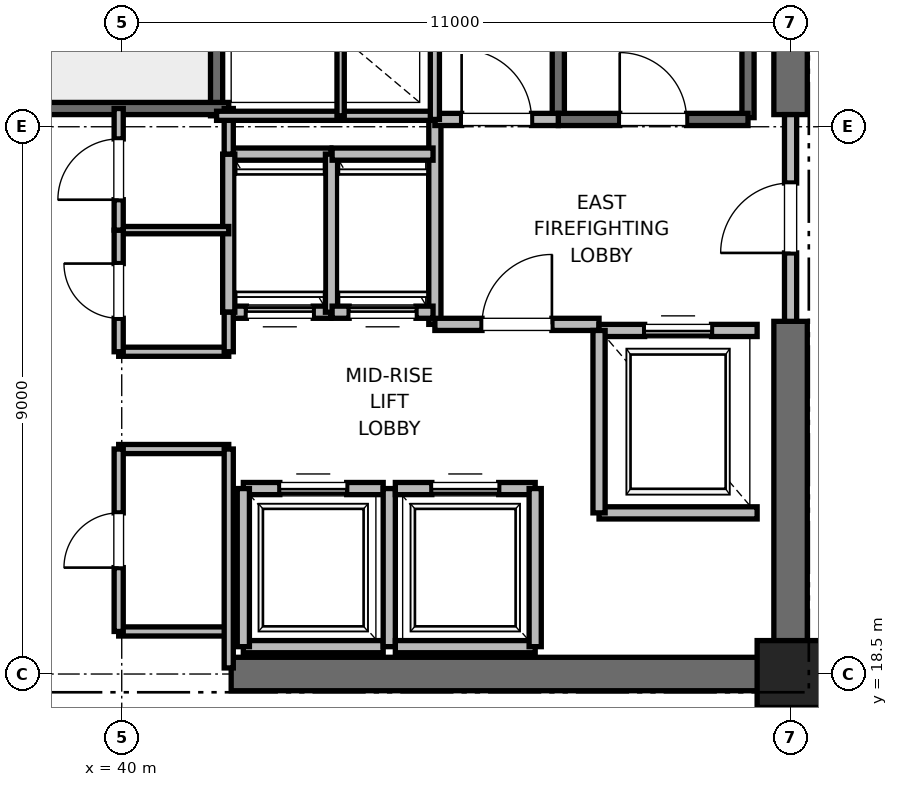
"""IFC4 building model, lengths in metres.
Left out: names, types, materials, properties, quantities, classifications, styles, units other than length and angle.
Written with IfcOpenShell. Run it as: python <this file> out.ifc"""

import sys

from ifc_helpers import new_model, si_unit, direction, frame, frame_2d, origin, origin_2d, place, context, subcontext, project, spatial, rectangle, extrude, element, fill, save


model = new_model("IFC4")
c1 = context("Model", 3, precision=1e-05, world=origin(), true_north=direction((0.0, 1.0)))
c2 = subcontext(c1, "Body", "Model", "MODEL_VIEW")
j1 = project(units=[si_unit("LENGTHUNIT", "METRE"), si_unit("PLANEANGLEUNIT", "RADIAN")], contexts=[c1])
p1 = place(None, origin())
s1 = spatial("IfcSite", under=j1, at=p1, CompositionType="ELEMENT")
p2 = place(p1, origin())
s2 = spatial("IfcBuilding", under=s1, at=p2, CompositionType="ELEMENT")
p3 = place(p2, frame((0.0, 0.0, 123.4)))
s3 = spatial("IfcBuildingStorey", under=s2, at=p3, CompositionType="ELEMENT", Elevation=123.4)
p4 = place(p3, frame((51.0, 18.5, 0.0), z_axis=(0.0, 0.0, 1.0), x_axis=(1.0, 0.0, 0.0)))
e1 = element("IfcColumn", 1, at=p4, inside=s3, PredefinedType="PILASTER", context=c2, shape_type="SweptSolid", body=[
    extrude(rectangle(XDim=1.1, YDim=1.1, at=origin_2d()), origin(), (0.0, 0.0, 1.0), 5.0),
])
p5 = place(p3, frame((41.8, 18.5, 0.0), z_axis=(0.0, 0.0, 1.0), x_axis=(1.0, 0.0, 0.0)))
e2 = element("IfcWall", 2, at=p5, inside=s3, PredefinedType="SHEAR", context=c2, shape_type="SweptSolid", body=[
    extrude(rectangle(XDim=9.2, YDim=0.55, at=frame_2d((4.6, 0.0))), origin(), (0.0, 0.0, 1.0), 4.775),
])
p6 = place(p3, frame((51.0, 18.5, 0.0), z_axis=(0.0, 0.0, 1.0), x_axis=(0.0, 1.0, 0.0)))
e3 = element("IfcWall", 3, at=p6, inside=s3, PredefinedType="SHEAR", context=c2, shape_type="SweptSolid", body=[
    extrude(rectangle(XDim=5.8, YDim=0.55, at=frame_2d((2.9, 0.0))), origin(), (0.0, 0.0, 1.0), 4.775),
])
p7 = place(p3, frame((51.0, 27.7, 0.0), z_axis=(0.0, 0.0, 1.0), x_axis=(0.0, 1.0, 0.0)))
e4 = element("IfcWall", 4, at=p7, inside=s3, PredefinedType="SHEAR", context=c2, shape_type="SweptSolid", body=[
    extrude(rectangle(XDim=8.8, YDim=0.55, at=frame_2d((4.4, 0.0))), origin(), (0.0, 0.0, 1.0), 4.775),
])
p8 = place(p3, frame((50.3, 27.65, 0.0), z_axis=(0.0, 0.0, 1.0), x_axis=(0.0, 1.0, 0.0)))
e5 = element("IfcWall", 5, at=p8, inside=s3, PredefinedType="SOLIDWALL", context=c2, shape_type="SweptSolid", body=[
    extrude(rectangle(XDim=8.15, YDim=0.2, at=frame_2d((4.075, 0.0))), origin(), (0.0, 0.0, 1.0), 4.775),
])
p9 = place(p3, frame((47.18, 27.62, 0.0), z_axis=(0.0, 0.0, 1.0), x_axis=(0.0, 1.0, 0.0)))
e6 = element("IfcWall", 6, at=p9, inside=s3, PredefinedType="SOLIDWALL", context=c2, shape_type="SweptSolid", body=[
    extrude(rectangle(XDim=8.18, YDim=0.2, at=frame_2d((4.09, 0.0))), origin(), (0.0, 0.0, 1.0), 4.775),
])
p10 = place(p3, frame((47.18, 27.62, 0.0), z_axis=(0.0, 0.0, 1.0), x_axis=(1.0, 0.0, 0.0)))
e7 = element("IfcWall", 7, at=p10, inside=s3, PredefinedType="SOLIDWALL", context=c2, shape_type="SweptSolid", body=[
    extrude(rectangle(XDim=3.12, YDim=0.2, at=frame_2d((1.56, 0.0))), origin(), (0.0, 0.0, 1.0), 4.775),
])
p11 = place(p10, frame((1.01, 0.0, 0.0)))
e8 = element("IfcOpeningElement", 8, at=p11, cuts=e7, PredefinedType="OPENING", context=c2, shape_type="SweptSolid", body=[
    extrude(rectangle(XDim=1.1, YDim=2.15, at=frame_2d((0.55, 1.075))), frame((0.0, 0.1, 0.0), z_axis=(0.0, -1.0, 0.0), x_axis=(1.0, 0.0, 0.0)), (0.0, 0.0, 1.0), 0.2),
])
p12 = place(p3, frame((41.56, 27.68, 0.0), z_axis=(0.0, 0.0, 1.0), x_axis=(0.0, 1.0, 0.0)))
e9 = element("IfcWall", 9, at=p12, inside=s3, PredefinedType="SOLIDWALL", context=c2, shape_type="SweptSolid", body=[
    extrude(rectangle(XDim=8.57, YDim=0.2, at=frame_2d((4.285, 0.0))), origin(), (0.0, 0.0, 1.0), 4.775),
])
p13 = place(p3, frame((38.44, 27.8, 0.0), z_axis=(0.0, 0.0, 1.0), x_axis=(1.0, 0.0, 0.0)))
e10 = element("IfcWall", 10, at=p13, inside=s3, PredefinedType="SOLIDWALL", context=c2, shape_type="SweptSolid", body=[
    extrude(rectangle(XDim=3.32, YDim=0.2, at=frame_2d((1.66, 0.0))), origin(), (0.0, 0.0, 1.0), 4.775),
])
p14 = place(p3, frame((45.15, 24.25, 0.0), z_axis=(0.0, 0.0, 1.0), x_axis=(0.0, 1.0, 0.0)))
e11 = element("IfcWall", 11, at=p14, inside=s3, PredefinedType="PARTITIONING", context=c2, shape_type="SweptSolid", body=[
    extrude(rectangle(XDim=3.37, YDim=0.2, at=frame_2d((1.685, 0.0))), origin(), (0.0, 0.0, 1.0), 4.775),
])
p15 = place(p3, frame((45.15, 24.25, 0.0), z_axis=(0.0, 0.0, 1.0), x_axis=(1.0, 0.0, 0.0)))
e12 = element("IfcWall", 12, at=p15, inside=s3, PredefinedType="PARTITIONING", context=c2, shape_type="SweptSolid", body=[
    extrude(rectangle(XDim=2.7, YDim=0.2, at=frame_2d((1.35, 0.0))), origin(), (0.0, 0.0, 1.0), 4.775),
])
p16 = place(p15, frame((0.775, 0.0, 0.0)))
e13 = element("IfcOpeningElement", 13, at=p16, cuts=e12, PredefinedType="OPENING", context=c2, shape_type="SweptSolid", body=[
    extrude(rectangle(XDim=1.15, YDim=2.2, at=frame_2d((0.575, 1.1))), frame((0.0, 0.1, 0.0), z_axis=(0.0, -1.0, 0.0), x_axis=(1.0, 0.0, 0.0)), (0.0, 0.0, 1.0), 0.2),
])
p17 = place(p3, frame((45.15, 27.62, 0.0), z_axis=(0.0, 0.0, 1.0), x_axis=(1.0, 0.0, 0.0)))
e14 = element("IfcWall", 14, at=p17, inside=s3, PredefinedType="PARTITIONING", context=c2, shape_type="SweptSolid", body=[
    extrude(rectangle(XDim=2.03, YDim=0.2, at=frame_2d((1.015, 0.0))), origin(), (0.0, 0.0, 1.0), 4.775),
])
p18 = place(p17, frame((0.44, 0.0, 0.0)))
e15 = element("IfcOpeningElement", 15, at=p18, cuts=e14, PredefinedType="OPENING", context=c2, shape_type="SweptSolid", body=[
    extrude(rectangle(XDim=1.15, YDim=2.2, at=frame_2d((0.575, 1.1))), frame((0.0, 0.1, 0.0), z_axis=(0.0, -1.0, 0.0), x_axis=(1.0, 0.0, 0.0)), (0.0, 0.0, 1.0), 0.2),
])
p19 = place(p3, frame((51.0, 24.3, 0.0), z_axis=(0.0, 0.0, 1.0), x_axis=(0.0, 1.0, 0.0)))
e16 = element("IfcWall", 16, at=p19, inside=s3, PredefinedType="PARTITIONING", context=c2, shape_type="SweptSolid", body=[
    extrude(rectangle(XDim=3.4, YDim=0.2, at=frame_2d((1.7, 0.0))), origin(), (0.0, 0.0, 1.0), 3.755),
])
p20 = place(p19, frame((1.125, 0.0, 0.0)))
e17 = element("IfcOpeningElement", 17, at=p20, cuts=e16, PredefinedType="OPENING", context=c2, shape_type="SweptSolid", body=[
    extrude(rectangle(XDim=1.15, YDim=2.2, at=frame_2d((0.575, 1.1))), frame((0.0, 0.1, 0.0), z_axis=(0.0, -1.0, 0.0), x_axis=(1.0, 0.0, 0.0)), (0.0, 0.0, 1.0), 0.2),
])
p21 = place(p3, frame((47.85, 21.15, 0.0), z_axis=(0.0, 0.0, 1.0), x_axis=(1.0, 0.0, 0.0)))
e18 = element("IfcWall", 18, at=p21, inside=s3, PredefinedType="SOLIDWALL", context=c2, shape_type="SweptSolid", body=[
    extrude(rectangle(XDim=2.6, YDim=0.2, at=frame_2d((1.3, 0.0))), origin(), (0.0, 0.0, 1.0), 4.775),
])
p22 = place(p3, frame((50.45, 24.15, 0.0), z_axis=(0.0, 0.0, 1.0), x_axis=(-1.0, 0.0, 0.0)))
e19 = element("IfcWall", 19, at=p22, inside=s3, PredefinedType="SOLIDWALL", context=c2, shape_type="SweptSolid", body=[
    extrude(rectangle(XDim=2.6, YDim=0.2, at=frame_2d((1.3, 0.0))), origin(), (0.0, 0.0, 1.0), 3.755),
])
p23 = place(p22, frame((0.75, 0.0, 0.0)))
e20 = element("IfcOpeningElement", 20, at=p23, cuts=e19, PredefinedType="OPENING", context=c2, shape_type="SweptSolid", body=[
    extrude(rectangle(XDim=1.1, YDim=2.2, at=frame_2d((0.55, 1.1))), frame((0.0, 0.1, 0.0), z_axis=(0.0, -1.0, 0.0), x_axis=(1.0, 0.0, 0.0)), (0.0, 0.0, 1.0), 0.2),
])
p24 = place(p3, frame((47.85, 24.15, 0.0), z_axis=(0.0, 0.0, 1.0), x_axis=(0.0, -1.0, 0.0)))
e21 = element("IfcWall", 21, at=p24, inside=s3, PredefinedType="SOLIDWALL", context=c2, shape_type="SweptSolid", body=[
    extrude(rectangle(XDim=3.0, YDim=0.2, at=frame_2d((1.5, 0.0))), origin(), (0.0, 0.0, 1.0), 4.775),
])
p25 = place(p3, frame((42.0, 18.95, 0.0), z_axis=(0.0, 0.0, 1.0), x_axis=(1.0, 0.0, 0.0)))
e22 = element("IfcWall", 22, at=p25, inside=s3, PredefinedType="SOLIDWALL", context=c2, shape_type="SweptSolid", body=[
    extrude(rectangle(XDim=2.3, YDim=0.2, at=frame_2d((1.15, 0.0))), origin(), (0.0, 0.0, 1.0), 3.755),
])
p26 = place(p3, frame((44.3, 21.55, 0.0), z_axis=(0.0, 0.0, 1.0), x_axis=(-1.0, 0.0, 0.0)))
e23 = element("IfcWall", 23, at=p26, inside=s3, PredefinedType="SOLIDWALL", context=c2, shape_type="SweptSolid", body=[
    extrude(rectangle(XDim=2.3, YDim=0.2, at=frame_2d((1.15, 0.0))), origin(), (0.0, 0.0, 1.0), 4.775),
])
p27 = place(p26, frame((0.6, 0.0, 0.0)))
e24 = element("IfcOpeningElement", 24, at=p27, cuts=e23, PredefinedType="OPENING", context=c2, shape_type="SweptSolid", body=[
    extrude(rectangle(XDim=1.1, YDim=2.2, at=frame_2d((0.55, 1.1))), frame((0.0, 0.1, 0.0), z_axis=(0.0, -1.0, 0.0), x_axis=(1.0, 0.0, 0.0)), (0.0, 0.0, 1.0), 0.2),
])
p28 = place(p3, frame((42.0, 21.55, 0.0), z_axis=(0.0, 0.0, 1.0), x_axis=(0.0, -1.0, 0.0)))
e25 = element("IfcWall", 25, at=p28, inside=s3, PredefinedType="SOLIDWALL", context=c2, shape_type="SweptSolid", body=[
    extrude(rectangle(XDim=2.6, YDim=0.2, at=frame_2d((1.3, 0.0))), origin(), (0.0, 0.0, 1.0), 3.755),
])
p29 = place(p3, frame((44.4, 18.95, 0.0), z_axis=(0.0, 0.0, 1.0), x_axis=(0.0, 1.0, 0.0)))
e26 = element("IfcWall", 26, at=p29, inside=s3, PredefinedType="SOLIDWALL", context=c2, shape_type="SweptSolid", body=[
    extrude(rectangle(XDim=2.6, YDim=0.2, at=frame_2d((1.3, 0.0))), origin(), (0.0, 0.0, 1.0), 4.775),
])
p30 = place(p3, frame((44.5, 18.95, 0.0), z_axis=(0.0, 0.0, 1.0), x_axis=(1.0, 0.0, 0.0)))
e27 = element("IfcWall", 27, at=p30, inside=s3, PredefinedType="SOLIDWALL", context=c2, shape_type="SweptSolid", body=[
    extrude(rectangle(XDim=2.3, YDim=0.2, at=frame_2d((1.15, 0.0))), origin(), (0.0, 0.0, 1.0), 4.775),
])
p31 = place(p3, frame((46.8, 21.55, 0.0), z_axis=(0.0, 0.0, 1.0), x_axis=(-1.0, 0.0, 0.0)))
e28 = element("IfcWall", 28, at=p31, inside=s3, PredefinedType="SOLIDWALL", context=c2, shape_type="SweptSolid", body=[
    extrude(rectangle(XDim=2.3, YDim=0.2, at=frame_2d((1.15, 0.0))), origin(), (0.0, 0.0, 1.0), 4.775),
])
p32 = place(p31, frame((0.6, 0.0, 0.0)))
e29 = element("IfcOpeningElement", 29, at=p32, cuts=e28, PredefinedType="OPENING", context=c2, shape_type="SweptSolid", body=[
    extrude(rectangle(XDim=1.1, YDim=2.2, at=frame_2d((0.55, 1.1))), frame((0.0, 0.1, 0.0), z_axis=(0.0, -1.0, 0.0), x_axis=(1.0, 0.0, 0.0)), (0.0, 0.0, 1.0), 0.2),
])
p33 = place(p3, frame((46.8, 18.95, 0.0), z_axis=(0.0, 0.0, 1.0), x_axis=(0.0, 1.0, 0.0)))
e30 = element("IfcWall", 30, at=p33, inside=s3, PredefinedType="SOLIDWALL", context=c2, shape_type="SweptSolid", body=[
    extrude(rectangle(XDim=2.6, YDim=0.2, at=frame_2d((1.3, 0.0))), origin(), (0.0, 0.0, 1.0), 4.775),
])
p34 = place(p3, frame((41.76, 24.45, 0.0), z_axis=(0.0, 0.0, 1.0), x_axis=(1.0, 0.0, 0.0)))
e31 = element("IfcWall", 31, at=p34, inside=s3, PredefinedType="SOLIDWALL", context=c2, shape_type="SweptSolid", body=[
    extrude(rectangle(XDim=1.68, YDim=0.2, at=frame_2d((0.84, 0.0))), origin(), (0.0, 0.0, 1.0), 4.775),
])
p35 = place(p34, frame((0.29, 0.0, 0.0)))
e32 = element("IfcOpeningElement", 32, at=p35, cuts=e31, PredefinedType="OPENING", context=c2, shape_type="SweptSolid", body=[
    extrude(rectangle(XDim=1.1, YDim=2.2, at=frame_2d((0.55, 1.1))), frame((0.0, 0.1, 0.0), z_axis=(0.0, -1.0, 0.0), x_axis=(1.0, 0.0, 0.0)), (0.0, 0.0, 1.0), 0.2),
])
p36 = place(p3, frame((43.44, 27.05, 0.0), z_axis=(0.0, 0.0, 1.0), x_axis=(-1.0, 0.0, 0.0)))
e33 = element("IfcWall", 33, at=p36, inside=s3, PredefinedType="SOLIDWALL", context=c2, shape_type="SweptSolid", body=[
    extrude(rectangle(XDim=1.68, YDim=0.2, at=frame_2d((0.84, 0.0))), origin(), (0.0, 0.0, 1.0), 4.775),
])
for number, where, z_axis, x_axis in (
    (34, (41.76, 27.05, 0.0), (0.0, 0.0, 1.0), (0.0, -1.0, 0.0)),
    (35, (43.45, 24.45, 0.0), (0.0, 0.0, 1.0), (0.0, 1.0, 0.0)),
):
    element("IfcWall", number, at=place(p3, frame(where, z_axis=z_axis, x_axis=x_axis)), inside=s3, PredefinedType="SOLIDWALL", context=c2, shape_type="SweptSolid", body=[
        extrude(rectangle(XDim=2.6, YDim=0.2, at=frame_2d((1.3, 0.0))), origin(), (0.0, 0.0, 1.0), 4.775),
    ])
p37 = place(p3, frame((43.46, 24.45, 0.0), z_axis=(0.0, 0.0, 1.0), x_axis=(1.0, 0.0, 0.0)))
e36 = element("IfcWall", 36, at=p37, inside=s3, PredefinedType="SOLIDWALL", context=c2, shape_type="SweptSolid", body=[
    extrude(rectangle(XDim=1.66, YDim=0.2, at=frame_2d((0.83, 0.0))), origin(), (0.0, 0.0, 1.0), 4.775),
])
p38 = place(p37, frame((0.28, 0.0, 0.0)))
e37 = element("IfcOpeningElement", 37, at=p38, cuts=e36, PredefinedType="OPENING", context=c2, shape_type="SweptSolid", body=[
    extrude(rectangle(XDim=1.1, YDim=2.2, at=frame_2d((0.55, 1.1))), frame((0.0, 0.1, 0.0), z_axis=(0.0, -1.0, 0.0), x_axis=(1.0, 0.0, 0.0)), (0.0, 0.0, 1.0), 0.2),
])
p39 = place(p3, frame((45.12, 27.05, 0.0), z_axis=(0.0, 0.0, 1.0), x_axis=(-1.0, 0.0, 0.0)))
e38 = element("IfcWall", 38, at=p39, inside=s3, PredefinedType="SOLIDWALL", context=c2, shape_type="SweptSolid", body=[
    extrude(rectangle(XDim=1.66, YDim=0.2, at=frame_2d((0.83, 0.0))), origin(), (0.0, 0.0, 1.0), 4.775),
])
for number, where, z_axis, x_axis in (
    (39, (39.95, 19.2, 0.0), (0.0, 0.0, 1.0), (1.0, 0.0, 0.0)),
    (40, (39.95, 22.2, 0.0), (0.0, 0.0, 1.0), (1.0, 0.0, 0.0)),
    (41, (39.95, 23.8, 0.0), (0.0, 0.0, 1.0), (1.0, 0.0, 0.0)),
):
    element("IfcWall", number, at=place(p3, frame(where, z_axis=z_axis, x_axis=x_axis)), inside=s3, PredefinedType="PARTITIONING", context=c2, shape_type="SweptSolid", body=[
        extrude(rectangle(XDim=1.81, YDim=0.15, at=frame_2d((0.905, 0.0))), origin(), (0.0, 0.0, 1.0), 2.85),
    ])
p40 = place(p3, frame((39.95, 25.8, 0.0), z_axis=(0.0, 0.0, 1.0), x_axis=(1.0, 0.0, 0.0)))
e42 = element("IfcWall", 42, at=p40, inside=s3, PredefinedType="PARTITIONING", context=c2, shape_type="SweptSolid", body=[
    extrude(rectangle(XDim=1.81, YDim=0.12, at=frame_2d((0.905, 0.0))), origin(), (0.0, 0.0, 1.0), 2.85),
])
p41 = place(p3, frame((41.76, 18.6, 0.0), z_axis=(0.0, 0.0, 1.0), x_axis=(0.0, 1.0, 0.0)))
e43 = element("IfcWall", 43, at=p41, inside=s3, PredefinedType="PARTITIONING", context=c2, shape_type="SweptSolid", body=[
    extrude(rectangle(XDim=3.6, YDim=0.15, at=frame_2d((1.8, 0.0))), origin(), (0.0, 0.0, 1.0), 2.85),
])
p42 = place(p3, frame((41.76, 23.8, 0.0), z_axis=(0.0, 0.0, 1.0), x_axis=(0.0, 1.0, 0.0)))
e44 = element("IfcWall", 44, at=p42, inside=s3, PredefinedType="PARTITIONING", context=c2, shape_type="SweptSolid", body=[
    extrude(rectangle(XDim=0.65, YDim=0.15, at=frame_2d((0.325, 0.0))), origin(), (0.0, 0.0, 1.0), 2.85),
])
p43 = place(p3, frame((41.76, 27.05, 0.0), z_axis=(0.0, 0.0, 1.0), x_axis=(0.0, 1.0, 0.0)))
e45 = element("IfcWall", 45, at=p43, inside=s3, PredefinedType="PARTITIONING", context=c2, shape_type="SweptSolid", body=[
    extrude(rectangle(XDim=0.75, YDim=0.15, at=frame_2d((0.375, 0.0))), origin(), (0.0, 0.0, 1.0), 2.85),
])
p44 = place(p3, frame((39.95, 19.2, 0.0), z_axis=(0.0, 0.0, 1.0), x_axis=(0.0, 1.0, 0.0)))
e46 = element("IfcWall", 46, at=p44, inside=s3, PredefinedType="PARTITIONING", context=c2, shape_type="SweptSolid", body=[
    extrude(rectangle(XDim=3.0, YDim=0.15, at=frame_2d((1.5, 0.0))), origin(), (0.0, 0.0, 1.0), 2.85),
])
p45 = place(p44, frame((1.05, 0.0, 0.0)))
e47 = element("IfcOpeningElement", 47, at=p45, cuts=e46, PredefinedType="OPENING", context=c2, shape_type="SweptSolid", body=[
    extrude(rectangle(XDim=0.9, YDim=2.1, at=frame_2d((0.45, 1.05))), frame((0.0, 0.075, 0.0), z_axis=(0.0, -1.0, 0.0), x_axis=(1.0, 0.0, 0.0)), (0.0, 0.0, 1.0), 0.15),
])
p46 = place(p3, frame((39.95, 23.8, 0.0), z_axis=(0.0, 0.0, 1.0), x_axis=(0.0, 1.0, 0.0)))
e48 = element("IfcWall", 48, at=p46, inside=s3, PredefinedType="PARTITIONING", context=c2, shape_type="SweptSolid", body=[
    extrude(rectangle(XDim=2.0, YDim=0.15, at=frame_2d((1.0, 0.0))), origin(), (0.0, 0.0, 1.0), 2.85),
])
p47 = place(p46, frame((0.55, 0.0, 0.0)))
e49 = element("IfcOpeningElement", 49, at=p47, cuts=e48, PredefinedType="OPENING", context=c2, shape_type="SweptSolid", body=[
    extrude(rectangle(XDim=0.9, YDim=2.1, at=frame_2d((0.45, 1.05))), frame((0.0, 0.075, 0.0), z_axis=(0.0, -1.0, 0.0), x_axis=(1.0, 0.0, 0.0)), (0.0, 0.0, 1.0), 0.15),
])
p48 = place(p3, frame((39.95, 25.8, 0.0), z_axis=(0.0, 0.0, 1.0), x_axis=(0.0, 1.0, 0.0)))
e50 = element("IfcWall", 50, at=p48, inside=s3, PredefinedType="PARTITIONING", context=c2, shape_type="SweptSolid", body=[
    extrude(rectangle(XDim=2.0, YDim=0.15, at=frame_2d((1.0, 0.0))), origin(), (0.0, 0.0, 1.0), 2.85),
])
p49 = place(p48, frame((0.5, 0.0, 0.0)))
e51 = element("IfcOpeningElement", 51, at=p49, cuts=e50, PredefinedType="OPENING", context=c2, shape_type="SweptSolid", body=[
    extrude(rectangle(XDim=1.0, YDim=2.15, at=frame_2d((0.5, 1.075))), frame((0.0, 0.075, 0.0), z_axis=(0.0, -1.0, 0.0), x_axis=(1.0, 0.0, 0.0)), (0.0, 0.0, 1.0), 0.15),
])
p50 = place(p3, frame((41.56, 27.68, 0.0), z_axis=(0.0, 0.0, 1.0), x_axis=(1.0, 0.0, 0.0)))
e52 = element("IfcWall", 52, at=p50, inside=s3, PredefinedType="PARTITIONING", context=c2, shape_type="SweptSolid", body=[
    extrude(rectangle(XDim=3.59, YDim=0.15, at=frame_2d((1.795, 0.0))), origin(), (0.0, 0.0, 1.0), 2.85),
])
p51 = place(p3, frame((45.15, 27.62, 0.0), z_axis=(0.0, 0.0, 1.0), x_axis=(0.0, 1.0, 0.0)))
e53 = element("IfcWall", 53, at=p51, inside=s3, PredefinedType="PARTITIONING", context=c2, shape_type="SweptSolid", body=[
    extrude(rectangle(XDim=3.1, YDim=0.15, at=frame_2d((1.55, 0.0))), origin(), (0.0, 0.0, 1.0), 2.85),
])
p52 = place(p3, frame((43.6, 27.68, 0.0), z_axis=(0.0, 0.0, 1.0), x_axis=(0.0, 1.0, 0.0)))
e54 = element("IfcWall", 54, at=p52, inside=s3, PredefinedType="PARTITIONING", context=c2, shape_type="SweptSolid", body=[
    extrude(rectangle(XDim=3.04, YDim=0.12, at=frame_2d((1.52, 0.0))), origin(), (0.0, 0.0, 1.0), 2.85),
])
p53 = place(p11, origin())
e55 = element("IfcDoor", 55, at=p53, inside=s3, OperationType="SINGLE_SWING_LEFT", PredefinedType="DOOR", context=c2, shape_type="SweptSolid", body=[
    extrude(rectangle(XDim=1.1, YDim=2.15, at=frame_2d((0.55, 1.075))), frame((0.0, 0.025, 0.0), z_axis=(0.0, -1.0, 0.0), x_axis=(1.0, 0.0, 0.0)), (0.0, 0.0, 1.0), 0.05),
])
fill(e8, e55)
p54 = place(p16, origin())
e56 = element("IfcDoor", 56, at=p54, inside=s3, OperationType="SINGLE_SWING_RIGHT", PredefinedType="DOOR", context=c2, shape_type="SweptSolid", body=[
    extrude(rectangle(XDim=1.15, YDim=2.2, at=frame_2d((0.575, 1.1))), frame((0.0, 0.025, 0.0), z_axis=(0.0, -1.0, 0.0), x_axis=(1.0, 0.0, 0.0)), (0.0, 0.0, 1.0), 0.05),
])
fill(e13, e56)
p55 = place(p18, origin())
e57 = element("IfcDoor", 57, at=p55, inside=s3, OperationType="SINGLE_SWING_LEFT", PredefinedType="DOOR", context=c2, shape_type="SweptSolid", body=[
    extrude(rectangle(XDim=1.15, YDim=2.2, at=frame_2d((0.575, 1.1))), frame((0.0, 0.025, 0.0), z_axis=(0.0, -1.0, 0.0), x_axis=(1.0, 0.0, 0.0)), (0.0, 0.0, 1.0), 0.05),
])
fill(e15, e57)
p56 = place(p20, origin())
e58 = element("IfcDoor", 58, at=p56, inside=s3, OperationType="SINGLE_SWING_LEFT", PredefinedType="DOOR", context=c2, shape_type="SweptSolid", body=[
    extrude(rectangle(XDim=1.15, YDim=2.2, at=frame_2d((0.575, 1.1))), frame((0.0, 0.025, 0.0), z_axis=(0.0, -1.0, 0.0), x_axis=(1.0, 0.0, 0.0)), (0.0, 0.0, 1.0), 0.05),
])
fill(e17, e58)
p57 = place(p23, origin())
e59 = element("IfcDoor", 59, at=p57, inside=s3, OperationType="SLIDING_TO_RIGHT", PredefinedType="DOOR", context=c2, shape_type="SweptSolid", body=[
    extrude(rectangle(XDim=1.1, YDim=2.2, at=frame_2d((0.55, 1.1))), frame((0.0, 0.025, 0.0), z_axis=(0.0, -1.0, 0.0), x_axis=(1.0, 0.0, 0.0)), (0.0, 0.0, 1.0), 0.05),
])
fill(e20, e59)
p58 = place(p27, origin())
e60 = element("IfcDoor", 60, at=p58, inside=s3, OperationType="SLIDING_TO_RIGHT", PredefinedType="DOOR", context=c2, shape_type="SweptSolid", body=[
    extrude(rectangle(XDim=1.1, YDim=2.2, at=frame_2d((0.55, 1.1))), frame((0.0, 0.025, 0.0), z_axis=(0.0, -1.0, 0.0), x_axis=(1.0, 0.0, 0.0)), (0.0, 0.0, 1.0), 0.05),
])
fill(e24, e60)
p59 = place(p32, origin())
e61 = element("IfcDoor", 61, at=p59, inside=s3, OperationType="SLIDING_TO_RIGHT", PredefinedType="DOOR", context=c2, shape_type="SweptSolid", body=[
    extrude(rectangle(XDim=1.1, YDim=2.2, at=frame_2d((0.55, 1.1))), frame((0.0, 0.025, 0.0), z_axis=(0.0, -1.0, 0.0), x_axis=(1.0, 0.0, 0.0)), (0.0, 0.0, 1.0), 0.05),
])
fill(e29, e61)
p60 = place(p35, origin())
e62 = element("IfcDoor", 62, at=p60, inside=s3, OperationType="SLIDING_TO_RIGHT", PredefinedType="DOOR", context=c2, shape_type="SweptSolid", body=[
    extrude(rectangle(XDim=1.1, YDim=2.2, at=frame_2d((0.55, 1.1))), frame((0.0, 0.025, 0.0), z_axis=(0.0, -1.0, 0.0), x_axis=(1.0, 0.0, 0.0)), (0.0, 0.0, 1.0), 0.05),
])
fill(e32, e62)
p61 = place(p38, origin())
e63 = element("IfcDoor", 63, at=p61, inside=s3, OperationType="SLIDING_TO_RIGHT", PredefinedType="DOOR", context=c2, shape_type="SweptSolid", body=[
    extrude(rectangle(XDim=1.1, YDim=2.2, at=frame_2d((0.55, 1.1))), frame((0.0, 0.025, 0.0), z_axis=(0.0, -1.0, 0.0), x_axis=(1.0, 0.0, 0.0)), (0.0, 0.0, 1.0), 0.05),
])
fill(e37, e63)
p62 = place(p45, origin())
e64 = element("IfcDoor", 64, at=p62, inside=s3, OperationType="SINGLE_SWING_LEFT", PredefinedType="DOOR", context=c2, shape_type="SweptSolid", body=[
    extrude(rectangle(XDim=0.9, YDim=2.1, at=frame_2d((0.45, 1.05))), frame((0.0, 0.025, 0.0), z_axis=(0.0, -1.0, 0.0), x_axis=(1.0, 0.0, 0.0)), (0.0, 0.0, 1.0), 0.05),
])
fill(e47, e64)
p63 = place(p47, origin())
e65 = element("IfcDoor", 65, at=p63, inside=s3, OperationType="SINGLE_SWING_RIGHT", PredefinedType="DOOR", context=c2, shape_type="SweptSolid", body=[
    extrude(rectangle(XDim=0.9, YDim=2.1, at=frame_2d((0.45, 1.05))), frame((0.0, 0.025, 0.0), z_axis=(0.0, -1.0, 0.0), x_axis=(1.0, 0.0, 0.0)), (0.0, 0.0, 1.0), 0.05),
])
fill(e49, e65)
p64 = place(p49, origin())
e66 = element("IfcDoor", 66, at=p64, inside=s3, OperationType="SINGLE_SWING_LEFT", PredefinedType="DOOR", context=c2, shape_type="SweptSolid", body=[
    extrude(rectangle(XDim=1.0, YDim=2.15, at=frame_2d((0.5, 1.075))), frame((0.0, 0.025, 0.0), z_axis=(0.0, -1.0, 0.0), x_axis=(1.0, 0.0, 0.0)), (0.0, 0.0, 1.0), 0.05),
])
fill(e51, e66)
save(model, sys.argv[1])
